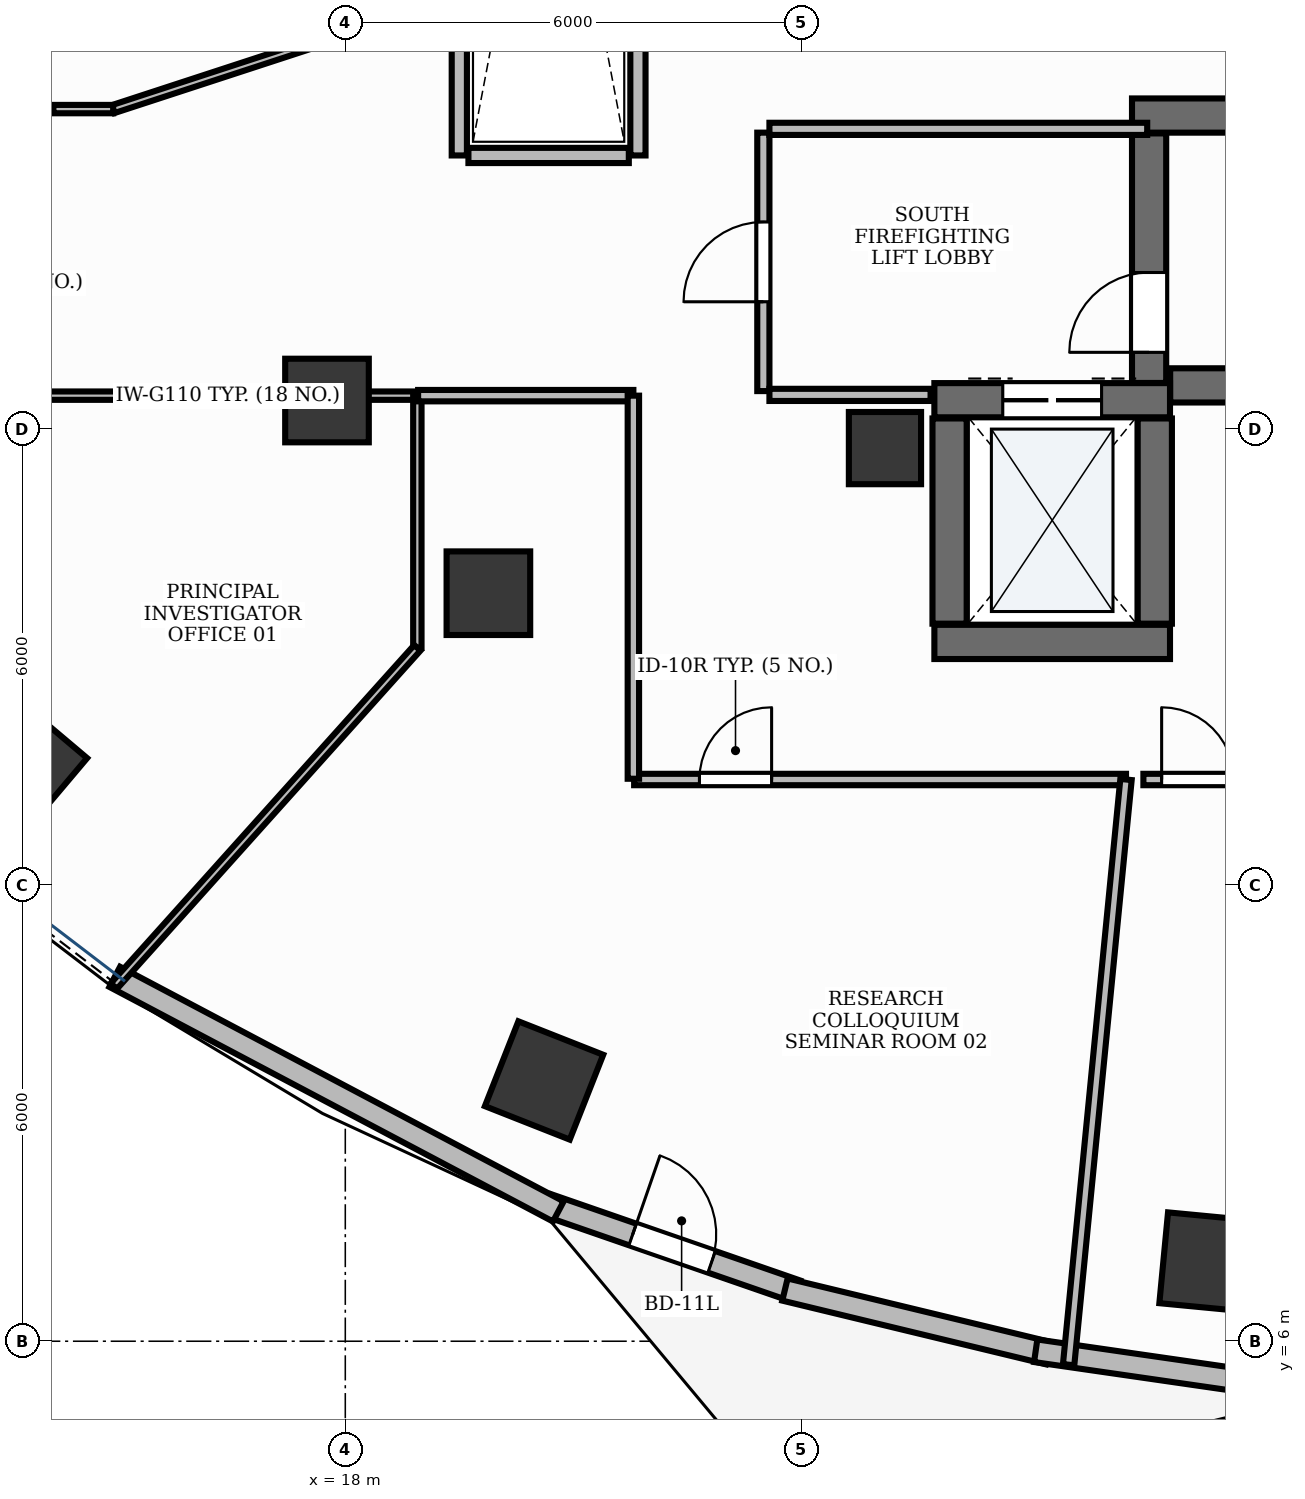
"""IFC4 building model, lengths in metres.
Left out: names, types, materials, properties, quantities, classifications, styles, units other than length and angle.
Written with IfcOpenShell. Run it as: python <this file> out.ifc"""

import sys

from ifc_helpers import new_model, si_unit, direction, frame, frame_2d, origin, origin_2d, place, context, subcontext, project, spatial, rectangle, extrude, element, fill, save


model = new_model("IFC4")
c1 = context("Model", 3, precision=1e-05, world=origin(), true_north=direction((0.0, 1.0)))
c2 = subcontext(c1, "Body", "Model", "MODEL_VIEW")
j1 = project(units=[si_unit("LENGTHUNIT", "METRE"), si_unit("PLANEANGLEUNIT", "RADIAN")], contexts=[c1])
p1 = place(None, origin())
s1 = spatial("IfcSite", under=j1, at=p1, CompositionType="ELEMENT")
p2 = place(p1, origin())
s2 = spatial("IfcBuilding", under=s1, at=p2, CompositionType="ELEMENT")
p3 = place(p2, frame((0.0, 0.0, 90.0)))
s3 = spatial("IfcBuildingStorey", under=s2, at=p3, CompositionType="ELEMENT", Elevation=90.0)
p4 = place(p3, frame((28.852, 18.575, 0.0), z_axis=(0.0, 0.0, 1.0), x_axis=(1.0, 0.0, 0.0)))
e1 = element("IfcWall", 1, at=p4, inside=s3, PredefinedType="SHEAR", context=c2, shape_type="SweptSolid", body=[
    extrude(rectangle(XDim=8.248, YDim=0.45, at=frame_2d((4.124, 0.0))), origin(), (0.0, 0.0, 1.0), 3.9),
])
p5 = place(p3, frame((28.35, 22.125, 0.0), z_axis=(0.0, 0.0, 1.0), x_axis=(1.0, 0.0, 0.0)))
e2 = element("IfcWall", 2, at=p5, inside=s3, PredefinedType="SHEAR", context=c2, shape_type="SweptSolid", body=[
    extrude(rectangle(XDim=8.75, YDim=0.45, at=frame_2d((4.375, 0.0))), origin(), (0.0, 0.0, 1.0), 3.9),
])
p6 = place(p3, frame((28.575, 18.607, 0.0), z_axis=(0.0, 0.0, 1.0), x_axis=(0.0, 1.0, 0.0)))
e3 = element("IfcWall", 3, at=p6, inside=s3, PredefinedType="SHEAR", context=c2, shape_type="SweptSolid", body=[
    extrude(rectangle(XDim=3.283, YDim=0.45, at=frame_2d((1.642, 0.0))), origin(), (0.0, 0.0, 1.0), 3.9),
])
p7 = place(p6, frame((0.403, 0.0, 0.0)))
e4 = element("IfcOpeningElement", 4, at=p7, cuts=e3, PredefinedType="OPENING", context=c2, shape_type="SweptSolid", body=[
    extrude(rectangle(XDim=1.05, YDim=2.15, at=frame_2d((0.525, 1.075))), frame((0.0, 0.24, 0.0), z_axis=(0.0, -1.0, 0.0), x_axis=(1.0, 0.0, 0.0)), (0.0, 0.0, 1.0), 0.48),
])
p8 = place(p3, frame((25.75, 15.2, 0.0), z_axis=(0.0, 0.0, 1.0), x_axis=(1.0, 0.0, 0.0)))
e5 = element("IfcWall", 5, at=p8, inside=s3, PredefinedType="SHEAR", context=c2, shape_type="SweptSolid", body=[
    extrude(rectangle(XDim=3.1, YDim=0.45, at=frame_2d((1.55, 0.0))), origin(), (0.0, 0.0, 1.0), 3.9),
])
p9 = place(p3, frame((25.75, 18.38, 0.0), z_axis=(0.0, 0.0, 1.0), x_axis=(1.0, 0.0, 0.0)))
e6 = element("IfcWall", 6, at=p9, inside=s3, PredefinedType="SHEAR", context=c2, shape_type="SweptSolid", body=[
    extrude(rectangle(XDim=3.1, YDim=0.45, at=frame_2d((1.55, 0.0))), origin(), (0.0, 0.0, 1.0), 3.9),
])
p10 = place(p9, frame((0.9, 0.0, 0.0)))
e7 = element("IfcOpeningElement", 7, at=p10, cuts=e6, PredefinedType="OPENING", context=c2, shape_type="SweptSolid", body=[
    extrude(rectangle(XDim=1.3, YDim=2.2, at=frame_2d((0.65, 1.1))), frame((0.0, 0.24, 0.0), z_axis=(0.0, -1.0, 0.0), x_axis=(1.0, 0.0, 0.0)), (0.0, 0.0, 1.0), 0.48),
])
for number, where, z_axis, x_axis in (
    (8, (25.95, 15.44, 0.0), (0.0, 0.0, 1.0), (0.0, 1.0, 0.0)),
    (9, (28.65, 15.44, 0.0), (0.0, 0.0, 1.0), (0.0, 1.0, 0.0)),
):
    element("IfcWall", number, at=place(p3, frame(where, z_axis=z_axis, x_axis=x_axis)), inside=s3, PredefinedType="SHEAR", context=c2, shape_type="SweptSolid", body=[
        extrude(rectangle(XDim=2.7, YDim=0.45, at=frame_2d((1.35, 0.0))), origin(), (0.0, 0.0, 1.0), 3.9),
    ])
p11 = place(p3, frame((25.1, 17.75, -0.0), z_axis=(0.0, 0.0, 1.0), x_axis=(1.0, 0.0, 0.0)))
e10 = element("IfcColumn", 10, at=p11, inside=s3, PredefinedType="PILASTER", context=c2, shape_type="SweptSolid", body=[
    extrude(rectangle(XDim=0.95, YDim=0.95, at=origin_2d()), origin(), (0.0, 0.0, 1.0), 3.901),
])
p12 = place(p3, frame((17.759, 18.376, -0.0), z_axis=(0.0, 0.0, 1.0), x_axis=(1.0, 0.0, 0.0)))
e11 = element("IfcColumn", 11, at=p12, inside=s3, PredefinedType="COLUMN", context=c2, shape_type="SweptSolid", body=[
    extrude(rectangle(XDim=1.1, YDim=1.1, at=origin_2d()), origin(), (0.0, 0.0, 1.0), 3.901),
])
p13 = place(p3, frame((13.758, 13.6, -0.0), z_axis=(0.0, 0.0, 1.0), x_axis=(-0.764246456939, 0.644924300253, 0.0)))
e12 = element("IfcColumn", 12, at=p13, inside=s3, PredefinedType="COLUMN", context=c2, shape_type="SweptSolid", body=[
    extrude(rectangle(XDim=1.2, YDim=1.2, at=origin_2d()), origin(), (0.0, 0.0, 1.0), 3.901),
])
p14 = place(p3, frame((19.883, 15.841, -0.0), z_axis=(0.0, 0.0, 1.0), x_axis=(1.0, 0.0, 0.0)))
e13 = element("IfcColumn", 13, at=p14, inside=s3, PredefinedType="COLUMN", context=c2, shape_type="SweptSolid", body=[
    extrude(rectangle(XDim=1.1, YDim=1.1, at=origin_2d()), origin(), (0.0, 0.0, 1.0), 3.901),
])
for number, where, z_axis, x_axis in (
    (14, (20.615, 9.431, -0.0), (0.0, 0.0, 1.0), (-0.93, 0.367, 0.0)),
    (15, (29.364, 7.041, -0.0), (0.0, 0.0, 1.0), (-0.995, 0.095, 0.0)),
):
    element("IfcColumn", number, at=place(p3, frame(where, z_axis=z_axis, x_axis=x_axis)), inside=s3, PredefinedType="COLUMN", context=c2, shape_type="SweptSolid", body=[
        extrude(rectangle(XDim=1.2, YDim=1.2, at=origin_2d()), origin(), (0.0, 0.0, 1.0), 3.901),
    ])
p15 = place(p3, frame((20.662, 7.792, 0.0), z_axis=(0.0, 0.0, 1.0), x_axis=(0.944878029854, -0.3274225232, 0.0)))
e16 = element("IfcWall", 16, at=p15, inside=s3, PredefinedType="STANDARD", context=c2, shape_type="SweptSolid", body=[
    extrude(rectangle(XDim=3.467, YDim=0.3, at=frame_2d((1.734, 0.0))), origin(), (0.0, 0.0, 1.0), 3.47),
])
p16 = place(p15, frame((1.184, 0.0, 0.0)))
e17 = element("IfcOpeningElement", 17, at=p16, cuts=e16, PredefinedType="OPENING", context=c2, shape_type="SweptSolid", body=[
    extrude(rectangle(XDim=1.1, YDim=2.15, at=frame_2d((0.55, 1.075))), frame((0.0, 0.165, 0.0), z_axis=(0.0, -1.0, 0.0), x_axis=(1.0, 0.0, 0.0)), (0.0, 0.0, 1.0), 0.33),
])
p17 = place(p3, frame((14.967, 10.794, 0.0), z_axis=(0.0, 0.0, 1.0), x_axis=(0.883986649445, -0.467512142734, 0.0)))
e18 = element("IfcWall", 18, at=p17, inside=s3, PredefinedType="STANDARD", context=c2, shape_type="SweptSolid", body=[
    extrude(rectangle(XDim=6.601, YDim=0.3, at=frame_2d((3.301, 0.0))), origin(), (0.0, 0.0, 1.0), 3.9),
])
p18 = place(p3, frame((23.784, 6.68, 0.0), z_axis=(0.0, 0.0, 1.0), x_axis=(0.972043452321, -0.234801036625, 0.0)))
e19 = element("IfcWall", 19, at=p18, inside=s3, PredefinedType="STANDARD", context=c2, shape_type="SweptSolid", body=[
    extrude(rectangle(XDim=3.569, YDim=0.3, at=frame_2d((1.784, 0.0))), origin(), (0.0, 0.0, 1.0), 3.9),
])
p19 = place(p3, frame((27.083, 5.875, 0.0), z_axis=(0.0, 0.0, 1.0), x_axis=(0.989734732902, -0.142916613754, 0.0)))
e20 = element("IfcWall", 20, at=p19, inside=s3, PredefinedType="STANDARD", context=c2, shape_type="SweptSolid", body=[
    extrude(rectangle(XDim=3.611, YDim=0.3, at=frame_2d((1.806, 0.0))), origin(), (0.0, 0.0, 1.0), 3.47),
])
for number, where, z_axis, x_axis in (
    (21, (19.5, 21.6, 0.0), (0.0, 0.0, 1.0), (0.0, 1.0, 0.0)),
    (22, (21.85, 21.6, 0.0), (0.0, 0.0, 1.0), (0.0, 1.0, 0.0)),
):
    element("IfcWall", number, at=place(p3, frame(where, z_axis=z_axis, x_axis=x_axis)), inside=s3, PredefinedType="PARTITIONING", context=c2, shape_type="SweptSolid", body=[
        extrude(rectangle(XDim=10.8, YDim=0.2, at=frame_2d((5.4, 0.0))), origin(), (0.0, 0.0, 1.0), 2.91),
    ])
p20 = place(p3, frame((19.62, 21.6, 0.0), z_axis=(0.0, 0.0, 1.0), x_axis=(1.0, 0.0, 0.0)))
e23 = element("IfcWall", 23, at=p20, inside=s3, PredefinedType="PARTITIONING", context=c2, shape_type="SweptSolid", body=[
    extrude(rectangle(XDim=2.11, YDim=0.2, at=frame_2d((1.055, 0.0))), origin(), (0.0, 0.0, 1.0), 2.91),
])
p21 = place(p3, frame((23.5, 18.5, 0.0), z_axis=(0.0, 0.0, 1.0), x_axis=(0.0, 1.0, 0.0)))
e24 = element("IfcWall", 24, at=p21, inside=s3, PredefinedType="PARTITIONING", context=c2, shape_type="SweptSolid", body=[
    extrude(rectangle(XDim=3.4, YDim=0.16, at=frame_2d((1.7, 0.0))), origin(), (0.0, 0.0, 1.0), 2.91),
])
p22 = place(p21, frame((1.175, 0.0, 0.0)))
e25 = element("IfcOpeningElement", 25, at=p22, cuts=e24, PredefinedType="OPENING", context=c2, shape_type="SweptSolid", body=[
    extrude(rectangle(XDim=1.05, YDim=2.15, at=frame_2d((0.525, 1.075))), frame((0.0, 0.095, 0.0), z_axis=(0.0, -1.0, 0.0), x_axis=(1.0, 0.0, 0.0)), (0.0, 0.0, 1.0), 0.19),
])
p23 = place(p3, frame((23.58, 21.95, 0.0), z_axis=(0.0, 0.0, 1.0), x_axis=(1.0, 0.0, 0.0)))
e26 = element("IfcWall", 26, at=p23, inside=s3, PredefinedType="PARTITIONING", context=c2, shape_type="SweptSolid", body=[
    extrude(rectangle(XDim=4.97, YDim=0.16, at=frame_2d((2.485, 0.0))), origin(), (0.0, 0.0, 1.0), 2.91),
])
p24 = place(p3, frame((23.58, 18.45, 0.0), z_axis=(0.0, 0.0, 1.0), x_axis=(1.0, 0.0, 0.0)))
e27 = element("IfcWall", 27, at=p24, inside=s3, PredefinedType="PARTITIONING", context=c2, shape_type="SweptSolid", body=[
    extrude(rectangle(XDim=2.12, YDim=0.16, at=frame_2d((1.06, 0.0))), origin(), (0.0, 0.0, 1.0), 2.91),
])
p25 = place(p3, frame((11.59, 18.44, 0.0), z_axis=(0.0, 0.0, 1.0), x_axis=(1.0, 0.0, 0.0)))
e28 = element("IfcWall", 28, at=p25, inside=s3, PredefinedType="MOVABLE", context=c2, shape_type="SweptSolid", body=[
    extrude(rectangle(XDim=7.358, YDim=0.11, at=frame_2d((3.679, 0.0))), origin(), (0.0, 0.0, 1.0), 2.91),
])
p26 = place(p25, frame((1.206, 0.0, 0.0)))
e29 = element("IfcOpeningElement", 29, at=p26, cuts=e28, PredefinedType="OPENING", context=c2, shape_type="SweptSolid", body=[
    extrude(rectangle(XDim=0.95, YDim=2.15, at=frame_2d((0.475, 1.075))), frame((0.0, 0.07, 0.0), z_axis=(0.0, -1.0, 0.0), x_axis=(1.0, 0.0, 0.0)), (0.0, 0.0, 1.0), 0.14),
])
p27 = place(p3, frame((21.8, 13.39, 0.0), z_axis=(0.0, 0.0, 1.0), x_axis=(1.0, 0.0, 0.0)))
e30 = element("IfcWall", 30, at=p27, inside=s3, PredefinedType="PARTITIONING", context=c2, shape_type="SweptSolid", body=[
    extrude(rectangle(XDim=6.471, YDim=0.15, at=frame_2d((3.236, 0.0))), origin(), (0.0, 0.0, 1.0), 2.91),
])
p28 = place(p27, frame((0.859, 0.0, 0.0)))
e31 = element("IfcOpeningElement", 31, at=p28, cuts=e30, PredefinedType="OPENING", context=c2, shape_type="SweptSolid", body=[
    extrude(rectangle(XDim=0.95, YDim=2.15, at=frame_2d((0.475, 1.075))), frame((0.0, 0.09, 0.0), z_axis=(0.0, -1.0, 0.0), x_axis=(1.0, 0.0, 0.0)), (0.0, 0.0, 1.0), 0.18),
])
p29 = place(p3, frame((28.5, 13.39, 0.0), z_axis=(0.0, 0.0, 1.0), x_axis=(1.0, 0.0, 0.0)))
e32 = element("IfcWall", 32, at=p29, inside=s3, PredefinedType="PARTITIONING", context=c2, shape_type="SweptSolid", body=[
    extrude(rectangle(XDim=7.1, YDim=0.15, at=frame_2d((3.55, 0.0))), origin(), (0.0, 0.0, 1.0), 2.91),
])
p30 = place(p29, frame((0.24, 0.0, 0.0)))
e33 = element("IfcOpeningElement", 33, at=p30, cuts=e32, PredefinedType="OPENING", context=c2, shape_type="SweptSolid", body=[
    extrude(rectangle(XDim=0.95, YDim=2.15, at=frame_2d((0.475, 1.075))), frame((0.0, 0.09, 0.0), z_axis=(0.0, -1.0, 0.0), x_axis=(1.0, 0.0, 0.0)), (0.0, 0.0, 1.0), 0.18),
])
p31 = place(p3, frame((18.948, 18.44, 0.0), z_axis=(0.0, 0.0, 1.0), x_axis=(0.0, -1.0, 0.0)))
e34 = element("IfcWall", 34, at=p31, inside=s3, PredefinedType="MOVABLE", context=c2, shape_type="SweptSolid", body=[
    extrude(rectangle(XDim=3.317, YDim=0.11, at=frame_2d((1.659, 0.0))), origin(), (0.0, 0.0, 1.0), 2.91),
])
p32 = place(p3, frame((18.948, 15.123, 0.0), z_axis=(0.0, 0.0, 1.0), x_axis=(-0.667833771006, -0.744310455592, 0.0)))
e35 = element("IfcWall", 35, at=p32, inside=s3, PredefinedType="MOVABLE", context=c2, shape_type="SweptSolid", body=[
    extrude(rectangle(XDim=5.979, YDim=0.11, at=frame_2d((2.99, 0.0))), origin(), (0.0, 0.0, 1.0), 2.91),
])
p33 = place(p3, frame((18.958, 18.44, 0.0), z_axis=(0.0, 0.0, 1.0), x_axis=(1.0, 0.0, 0.0)))
e36 = element("IfcWall", 36, at=p33, inside=s3, PredefinedType="PARTITIONING", context=c2, shape_type="SweptSolid", body=[
    extrude(rectangle(XDim=2.832, YDim=0.15, at=frame_2d((1.416, 0.0))), origin(), (0.0, 0.0, 1.0), 2.91),
])
p34 = place(p3, frame((21.79, 18.44, 0.0), z_axis=(0.0, 0.0, 1.0), x_axis=(0.0, -1.0, 0.0)))
e37 = element("IfcWall", 37, at=p34, inside=s3, PredefinedType="PARTITIONING", context=c2, shape_type="SweptSolid", body=[
    extrude(rectangle(XDim=5.04, YDim=0.15, at=frame_2d((2.52, 0.0))), origin(), (0.0, 0.0, 1.0), 2.91),
])
p35 = place(p3, frame((28.271, 13.39, 0.0), z_axis=(0.0, 0.0, 1.0), x_axis=(-0.097584908723, -0.995227202999, 0.0)))
e38 = element("IfcWall", 38, at=p35, inside=s3, PredefinedType="PARTITIONING", context=c2, shape_type="SweptSolid", body=[
    extrude(rectangle(XDim=7.736, YDim=0.15, at=frame_2d((3.868, 0.0))), origin(), (0.0, 0.0, 1.0), 2.91),
])
p36 = place(p3, frame((18.948, 23.518, 0.0), z_axis=(0.0, 0.0, 1.0), x_axis=(-0.950522660163, -0.31065523095, 0.0)))
e39 = element("IfcWall", 39, at=p36, inside=s3, PredefinedType="MOVABLE", context=c2, shape_type="SweptSolid", body=[
    extrude(rectangle(XDim=4.21, YDim=0.11, at=frame_2d((2.105, 0.0))), origin(), (0.0, 0.0, 1.0), 2.91),
])
p37 = place(p3, frame((14.946, 22.21, 0.0), z_axis=(0.0, 0.0, 1.0), x_axis=(-1.0, 0.0, 0.0)))
e40 = element("IfcWall", 40, at=p37, inside=s3, PredefinedType="MOVABLE", context=c2, shape_type="SweptSolid", body=[
    extrude(rectangle(XDim=0.786, YDim=0.11, at=frame_2d((0.393, 0.0))), origin(), (0.0, 0.0, 1.0), 2.91),
])
p38 = place(p16, origin())
e41 = element("IfcDoor", 41, at=p38, inside=s3, OperationType="SINGLE_SWING_LEFT", PredefinedType="DOOR", context=c2, shape_type="SweptSolid", body=[
    extrude(rectangle(XDim=1.1, YDim=2.15, at=frame_2d((0.55, 1.075))), frame((0.0, 0.025, 0.0), z_axis=(0.0, -1.0, 0.0), x_axis=(1.0, 0.0, 0.0)), (0.0, 0.0, 1.0), 0.05),
])
fill(e17, e41)
p39 = place(p7, origin())
e42 = element("IfcDoor", 42, at=p39, inside=s3, OperationType="SINGLE_SWING_LEFT", PredefinedType="DOOR", context=c2, shape_type="SweptSolid", body=[
    extrude(rectangle(XDim=1.05, YDim=2.15, at=frame_2d((0.525, 1.075))), frame((0.0, 0.025, 0.0), z_axis=(0.0, -1.0, 0.0), x_axis=(1.0, 0.0, 0.0)), (0.0, 0.0, 1.0), 0.05),
])
fill(e4, e42)
p40 = place(p10, origin())
e43 = element("IfcDoor", 43, at=p40, inside=s3, OperationType="DOUBLE_DOOR_SLIDING", PredefinedType="DOOR", context=c2, shape_type="SweptSolid", body=[
    extrude(rectangle(XDim=1.3, YDim=2.2, at=frame_2d((0.65, 1.1))), frame((0.0, 0.025, 0.0), z_axis=(0.0, -1.0, 0.0), x_axis=(1.0, 0.0, 0.0)), (0.0, 0.0, 1.0), 0.05),
])
fill(e7, e43)
p41 = place(p22, origin())
e44 = element("IfcDoor", 44, at=p41, inside=s3, OperationType="SINGLE_SWING_LEFT", PredefinedType="DOOR", context=c2, shape_type="SweptSolid", body=[
    extrude(rectangle(XDim=1.05, YDim=2.15, at=frame_2d((0.525, 1.075))), frame((0.0, 0.025, 0.0), z_axis=(0.0, -1.0, 0.0), x_axis=(1.0, 0.0, 0.0)), (0.0, 0.0, 1.0), 0.05),
])
fill(e25, e44)
p42 = place(p28, origin())
e45 = element("IfcDoor", 45, at=p42, inside=s3, OperationType="SINGLE_SWING_RIGHT", PredefinedType="DOOR", context=c2, shape_type="SweptSolid", body=[
    extrude(rectangle(XDim=0.95, YDim=2.15, at=frame_2d((0.475, 1.075))), frame((0.0, 0.025, 0.0), z_axis=(0.0, -1.0, 0.0), x_axis=(1.0, 0.0, 0.0)), (0.0, 0.0, 1.0), 0.05),
])
fill(e31, e45)
p43 = place(p30, origin())
e46 = element("IfcDoor", 46, at=p43, inside=s3, OperationType="SINGLE_SWING_LEFT", PredefinedType="DOOR", context=c2, shape_type="SweptSolid", body=[
    extrude(rectangle(XDim=0.95, YDim=2.15, at=frame_2d((0.475, 1.075))), frame((0.0, 0.025, 0.0), z_axis=(0.0, -1.0, 0.0), x_axis=(1.0, 0.0, 0.0)), (0.0, 0.0, 1.0), 0.05),
])
fill(e33, e46)
save(model, sys.argv[1])
